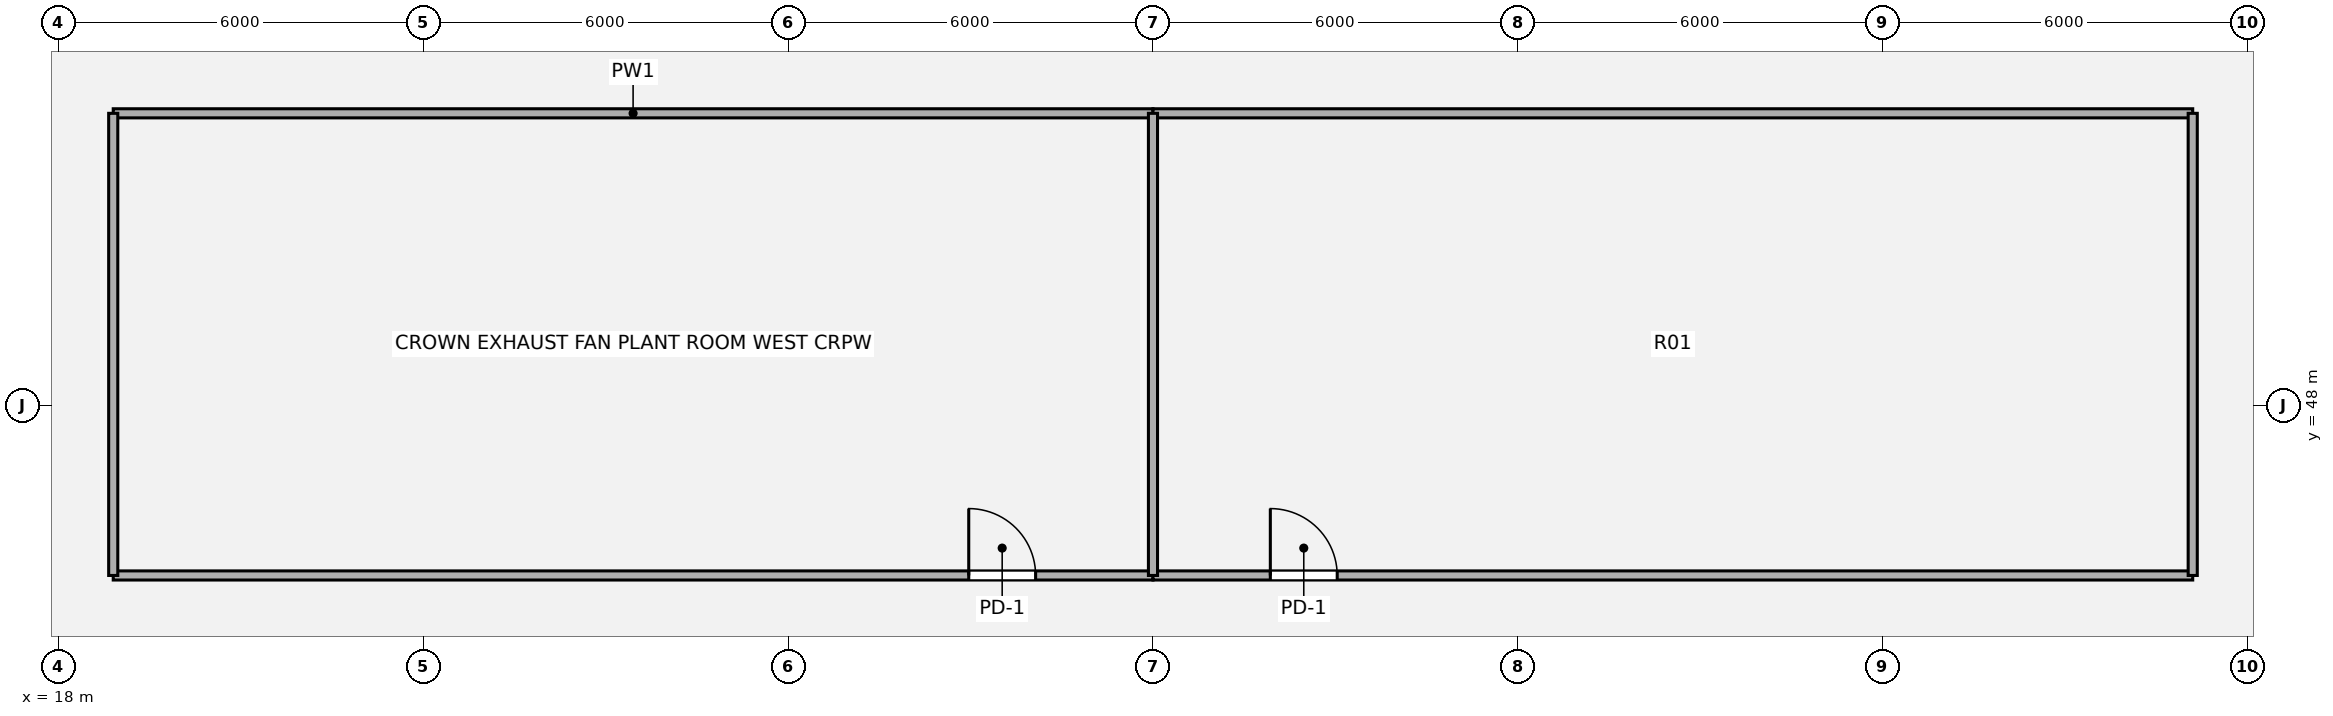
"""IFC4 building model, lengths in metres.
Left out: names, types, materials, properties, quantities, classifications, styles, units other than length and angle.
Written with IfcOpenShell. Run it as: python <this file> out.ifc"""

import sys

from ifc_helpers import new_model, si_unit, direction, frame, frame_2d, origin, origin_2d, place, context, subcontext, project, spatial, rectangle, extrude, source, transform, mapped, element, fill, save


model = new_model("IFC4")
c1 = context("Model", 3, precision=1e-05, world=origin(), true_north=direction((0.0, 1.0)))
c2 = subcontext(c1, "Body", "Model", "MODEL_VIEW")
j1 = project(units=[si_unit("LENGTHUNIT", "METRE"), si_unit("PLANEANGLEUNIT", "RADIAN")], contexts=[c1])
p1 = place(None, origin())
s1 = spatial("IfcSite", under=j1, at=p1, CompositionType="ELEMENT")
p2 = place(p1, origin())
s2 = spatial("IfcBuilding", under=s1, at=p2, CompositionType="ELEMENT")
p3 = place(p2, frame((0.0, 0.0, 295.92)))
s3 = spatial("IfcBuildingStorey", under=s2, at=p3, CompositionType="ELEMENT", Elevation=295.92)
p4 = place(p3, frame((18.9, 45.2, 0.0), z_axis=(0.0, 0.0, 1.0), x_axis=(1.0, 0.0, 0.0)))
e1 = element("IfcWall", 1, at=p4, inside=s3, PredefinedType="PARTITIONING", context=c2, shape_type="SweptSolid", body=[
    extrude(rectangle(XDim=17.1, YDim=0.15, at=frame_2d((8.55, 0.0))), origin(), (0.0, 0.0, 1.0), 3.162),
])
p5 = place(p4, frame((14.07, 0.0, 0.0)))
e2 = element("IfcOpeningElement", 2, at=p5, cuts=e1, PredefinedType="OPENING", context=c2, shape_type="SweptSolid", body=[
    extrude(rectangle(XDim=1.1, YDim=2.1, at=origin_2d()), frame((0.55, 0.085, 1.05), z_axis=(0.0, -1.0, 0.0), x_axis=(1.0, 0.0, 0.0)), (0.0, 0.0, 1.0), 0.17),
])
p6 = place(p3, frame((36.0, 45.2, 0.0), z_axis=(0.0, 0.0, 1.0), x_axis=(1.0, 0.0, 0.0)))
e3 = element("IfcWall", 3, at=p6, inside=s3, PredefinedType="PARTITIONING", context=c2, shape_type="SweptSolid", body=[
    extrude(rectangle(XDim=17.1, YDim=0.15, at=frame_2d((8.55, 0.0))), origin(), (0.0, 0.0, 1.0), 3.162),
])
p7 = place(p6, frame((1.93, 0.0, 0.0)))
e4 = element("IfcOpeningElement", 4, at=p7, cuts=e3, PredefinedType="OPENING", context=c2, shape_type="SweptSolid", body=[
    extrude(rectangle(XDim=1.1, YDim=2.1, at=origin_2d()), frame((0.55, 0.085, 1.05), z_axis=(0.0, -1.0, 0.0), x_axis=(1.0, 0.0, 0.0)), (0.0, 0.0, 1.0), 0.17),
])
for number, where, z_axis, x_axis in (
    (5, (18.9, 52.8, 0.0), (0.0, 0.0, 1.0), (1.0, 0.0, 0.0)),
    (6, (36.0, 52.8, 0.0), (0.0, 0.0, 1.0), (1.0, 0.0, 0.0)),
):
    element("IfcWall", number, at=place(p3, frame(where, z_axis=z_axis, x_axis=x_axis)), inside=s3, PredefinedType="PARTITIONING", context=c2, shape_type="SweptSolid", body=[
        extrude(rectangle(XDim=17.1, YDim=0.15, at=frame_2d((8.55, 0.0))), origin(), (0.0, 0.0, 1.0), 3.162),
    ])
for number, where, z_axis, x_axis in (
    (7, (18.9, 45.2, 0.0), (0.0, 0.0, 1.0), (0.0, 1.0, 0.0)),
    (8, (36.0, 45.2, 0.0), (0.0, 0.0, 1.0), (0.0, 1.0, 0.0)),
    (9, (53.1, 45.2, 0.0), (0.0, 0.0, 1.0), (0.0, 1.0, 0.0)),
):
    element("IfcWall", number, at=place(p3, frame(where, z_axis=z_axis, x_axis=x_axis)), inside=s3, PredefinedType="PARTITIONING", context=c2, shape_type="SweptSolid", body=[
        extrude(rectangle(XDim=7.6, YDim=0.15, at=frame_2d((3.8, 0.0))), origin(), (0.0, 0.0, 1.0), 3.68),
    ])
m1 = source(origin(), c2, "Body", "SweptSolid", [
    extrude(rectangle(XDim=1.1, YDim=2.1, at=origin_2d()), frame((0.55, 0.025, 1.05), z_axis=(0.0, -1.0, 0.0), x_axis=(1.0, 0.0, 0.0)), (0.0, 0.0, 1.0), 0.05),
])
p8 = place(p5, origin())
e10 = element("IfcDoor", 10, at=p8, inside=s3, OperationType="SINGLE_SWING_LEFT", PredefinedType="DOOR", context=c2, shape_type="MappedRepresentation", body=[
    mapped(m1, transform((0.0, 0.0, 0.0), x_axis=(1.0, 0.0, 0.0), y_axis=(0.0, 1.0, 0.0), z_axis=(0.0, 0.0, 1.0), scale=1.0)),
])
fill(e2, e10)
p9 = place(p7, origin())
e11 = element("IfcDoor", 11, at=p9, inside=s3, OperationType="SINGLE_SWING_LEFT", PredefinedType="DOOR", context=c2, shape_type="MappedRepresentation", body=[
    mapped(m1, transform((0.0, 0.0, 0.0), x_axis=(1.0, 0.0, 0.0), y_axis=(0.0, 1.0, 0.0), z_axis=(0.0, 0.0, 1.0), scale=1.0)),
])
fill(e4, e11)
save(model, sys.argv[1])
